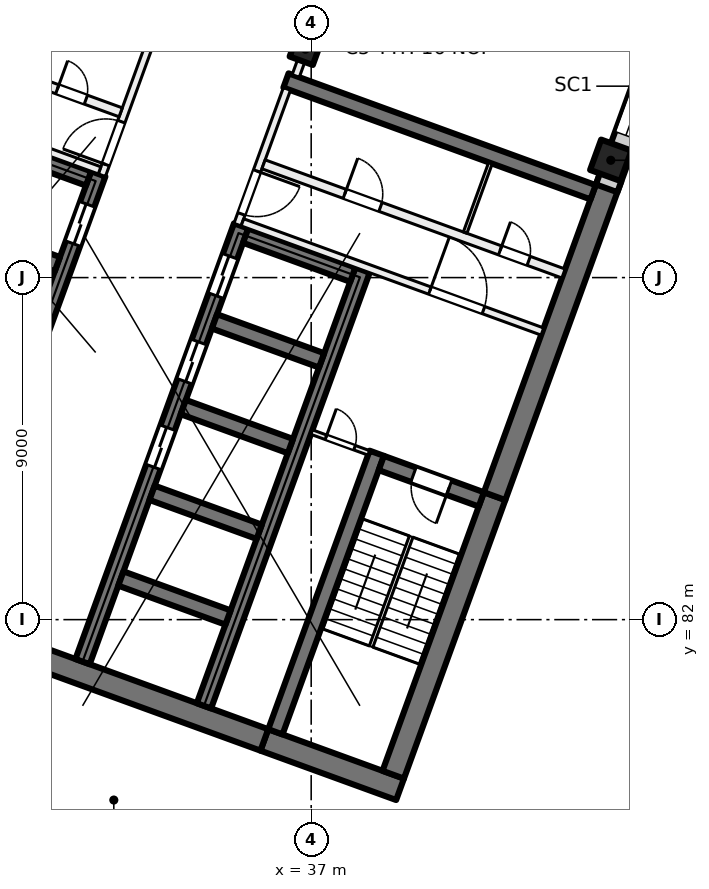
"""IFC4 building model, lengths in metres.
Left out: names, types, materials, properties, quantities, classifications, styles, units other than length and angle.
Written with IfcOpenShell. Run it as: python <this file> out.ifc"""

import sys

from ifc_helpers import new_model, si_unit, direction, frame, frame_2d, origin, origin_2d, place, context, subcontext, project, spatial, rectangle, extrude, element, fill, save


model = new_model("IFC4")
c1 = context("Model", 3, precision=1e-05, world=origin(), true_north=direction((0.0, 1.0)))
c2 = subcontext(c1, "Body", "Model", "MODEL_VIEW")
j1 = project(units=[si_unit("LENGTHUNIT", "METRE"), si_unit("PLANEANGLEUNIT", "RADIAN")], contexts=[c1])
p1 = place(None, origin())
s1 = spatial("IfcSite", under=j1, at=p1, CompositionType="ELEMENT")
p2 = place(p1, origin())
s2 = spatial("IfcBuilding", under=s1, at=p2, CompositionType="ELEMENT")
p3 = place(p2, frame((0.0, 0.0, 105.0)))
s3 = spatial("IfcBuildingStorey", under=s2, at=p3, CompositionType="ELEMENT", Elevation=105.0)
p4 = place(p3, frame((36.849, 97.011, 0.0), z_axis=(0.0, 0.0, 1.0), x_axis=(-0.342020143326, -0.939692620786, 0.0)))
e1 = element("IfcColumn", 1, at=p4, inside=s3, PredefinedType="COLUMN", context=c2, shape_type="SweptSolid", body=[
    extrude(rectangle(XDim=0.65, YDim=0.65, at=origin_2d()), origin(), (0.0, 0.0, 1.0), 4.0),
])
p5 = place(p3, frame((44.884, 94.087, 0.0), z_axis=(0.0, 0.0, 1.0), x_axis=(-0.342020143326, -0.939692620786, 0.0)))
e2 = element("IfcColumn", 2, at=p5, inside=s3, PredefinedType="COLUMN", context=c2, shape_type="SweptSolid", body=[
    extrude(rectangle(XDim=0.85, YDim=0.85, at=origin_2d()), origin(), (0.0, 0.0, 1.0), 4.0),
])
p6 = place(p3, frame((39.338, 77.535, 0.0), z_axis=(0.0, 0.0, 1.0), x_axis=(-0.939701471648, 0.341995824804, 0.0)))
e3 = element("IfcWall", 3, at=p6, inside=s3, PredefinedType="SHEAR", context=c2, shape_type="SweptSolid", body=[
    extrude(rectangle(XDim=3.8, YDim=0.6, at=frame_2d((1.9, 0.0))), origin(), (0.0, 0.0, 1.0), 4.0),
])
p7 = place(p3, frame((35.767, 78.835, 0.0), z_axis=(0.0, 0.0, 1.0), x_axis=(-0.939692894512, 0.342019391267, 0.0)))
e4 = element("IfcWall", 4, at=p7, inside=s3, PredefinedType="SHEAR", context=c2, shape_type="SweptSolid", body=[
    extrude(rectangle(XDim=14.4, YDim=0.6, at=frame_2d((7.2, 0.0))), origin(), (0.0, 0.0, 1.0), 4.0),
])
p8 = place(p3, frame((39.159, 77.92, 0.0), z_axis=(0.0, 0.0, 1.0), x_axis=(0.342016982193, 0.939693771338, 0.0)))
e5 = element("IfcWall", 5, at=p8, inside=s3, PredefinedType="SHEAR", context=c2, shape_type="SweptSolid", body=[
    extrude(rectangle(XDim=7.8, YDim=0.6, at=frame_2d((3.9, 0.0))), origin(), (0.0, 0.0, 1.0), 4.0),
])
p9 = place(p3, frame((41.827, 85.249, 0.0), z_axis=(0.0, 0.0, 1.0), x_axis=(0.342017595281, 0.939693548195, 0.0)))
e6 = element("IfcWall", 6, at=p9, inside=s3, PredefinedType="SHEAR", context=c2, shape_type="SweptSolid", body=[
    extrude(rectangle(XDim=8.925, YDim=0.6, at=frame_2d((4.462, 0.0))), origin(), (0.0, 0.0, 1.0), 4.0),
])
p10 = place(p3, frame((36.058, 79.048, 0.0), z_axis=(0.0, 0.0, 1.0), x_axis=(0.342016982193, 0.939693771338, 0.0)))
e7 = element("IfcWall", 7, at=p10, inside=s3, PredefinedType="SHEAR", context=c2, shape_type="SweptSolid", body=[
    extrude(rectangle(XDim=7.8, YDim=0.4, at=frame_2d((3.9, 0.0))), origin(), (0.0, 0.0, 1.0), 4.0),
])
p11 = place(p3, frame((41.476, 85.164, 0.0), z_axis=(0.0, 0.0, 1.0), x_axis=(-0.939678810556, 0.342058084236, 0.0)))
e8 = element("IfcWall", 8, at=p11, inside=s3, PredefinedType="SHEAR", context=c2, shape_type="SweptSolid", body=[
    extrude(rectangle(XDim=2.8, YDim=0.4, at=frame_2d((1.4, 0.0))), origin(), (0.0, 0.0, 1.0), 4.0),
])
p12 = place(p11, frame((0.9, 0.0, 0.0)))
e9 = element("IfcOpeningElement", 9, at=p12, cuts=e8, PredefinedType="OPENING", context=c2, shape_type="SweptSolid", body=[
    extrude(rectangle(XDim=1.0, YDim=2.1, at=frame_2d((0.5, 1.05))), frame((0.0, 0.21, 0.0), z_axis=(0.0, -1.0, 0.0), x_axis=(1.0, 0.0, 0.0)), (0.0, 0.0, 1.0), 0.42),
])
p13 = place(p3, frame((30.984, 80.895, 0.0), z_axis=(0.0, 0.0, 1.0), x_axis=(0.342021021735, 0.939692301071, 0.0)))
e10 = element("IfcWall", 10, at=p13, inside=s3, PredefinedType="SHEAR", context=c2, shape_type="SweptSolid", body=[
    extrude(rectangle(XDim=12.2, YDim=0.4, at=frame_2d((6.1, 0.0))), origin(), (0.0, 0.0, 1.0), 4.0),
])
p14 = place(p13, frame((5.45, 0.0, 0.0)))
e11 = element("IfcOpeningElement", 11, at=p14, cuts=e10, PredefinedType="OPENING", context=c2, shape_type="SweptSolid", body=[
    extrude(rectangle(XDim=1.1, YDim=2.1, at=frame_2d((0.55, 1.05))), frame((0.0, 0.21, 0.0), z_axis=(0.0, -1.0, 0.0), x_axis=(1.0, 0.0, 0.0)), (0.0, 0.0, 1.0), 0.42),
])
p15 = place(p13, frame((7.85, 0.0, 0.0)))
e12 = element("IfcOpeningElement", 12, at=p15, cuts=e10, PredefinedType="OPENING", context=c2, shape_type="SweptSolid", body=[
    extrude(rectangle(XDim=1.1, YDim=2.1, at=frame_2d((0.55, 1.05))), frame((0.0, 0.21, 0.0), z_axis=(0.0, -1.0, 0.0), x_axis=(1.0, 0.0, 0.0)), (0.0, 0.0, 1.0), 0.42),
])
p16 = place(p13, frame((10.25, 0.0, 0.0)))
e13 = element("IfcOpeningElement", 13, at=p16, cuts=e10, PredefinedType="OPENING", context=c2, shape_type="SweptSolid", body=[
    extrude(rectangle(XDim=1.1, YDim=2.1, at=frame_2d((0.55, 1.05))), frame((0.0, 0.21, 0.0), z_axis=(0.0, -1.0, 0.0), x_axis=(1.0, 0.0, 0.0)), (0.0, 0.0, 1.0), 0.42),
])
p17 = place(p3, frame((34.178, 79.732, 0.0), z_axis=(0.0, 0.0, 1.0), x_axis=(0.342014590177, 0.939694641948, 0.0)))
e14 = element("IfcWall", 14, at=p17, inside=s3, PredefinedType="SHEAR", context=c2, shape_type="SweptSolid", body=[
    extrude(rectangle(XDim=12.2, YDim=0.4, at=frame_2d((6.1, 0.0))), origin(), (0.0, 0.0, 1.0), 4.0),
])
for number, where, z_axis, x_axis in (
    (15, (34.812, 82.056, 0.0), (0.0, 0.0, 1.0), (-0.94, 0.342, 0.0)),
    (16, (35.632, 84.311, 0.0), (0.0, 0.0, 1.0), (-0.94, 0.342, 0.0)),
    (17, (36.453, 86.566, 0.0), (0.0, 0.0, 1.0), (-0.94, 0.342, 0.0)),
    (18, (37.274, 88.822, 0.0), (0.0, 0.0, 1.0), (-0.94, 0.342, 0.0)),
):
    element("IfcWall", number, at=place(p3, frame(where, z_axis=z_axis, x_axis=x_axis)), inside=s3, PredefinedType="SHEAR", context=c2, shape_type="SweptSolid", body=[
        extrude(rectangle(XDim=3.0, YDim=0.4, at=frame_2d((1.5, 0.0))), origin(), (0.0, 0.0, 1.0), 4.0),
    ])
p18 = place(p3, frame((38.095, 91.077, 0.0), z_axis=(0.0, 0.0, 1.0), x_axis=(-0.939676934218, 0.342063238742, 0.0)))
e19 = element("IfcWall", 19, at=p18, inside=s3, PredefinedType="SHEAR", context=c2, shape_type="SweptSolid", body=[
    extrude(rectangle(XDim=3.0, YDim=0.4, at=frame_2d((1.5, 0.0))), origin(), (0.0, 0.0, 1.0), 4.0),
])
p19 = place(p3, frame((27.225, 82.263, 0.0), z_axis=(0.0, 0.0, 1.0), x_axis=(0.342014590177, 0.939694641948, 0.0)))
e20 = element("IfcWall", 20, at=p19, inside=s3, PredefinedType="SHEAR", context=c2, shape_type="SweptSolid", body=[
    extrude(rectangle(XDim=12.2, YDim=0.4, at=frame_2d((6.1, 0.0))), origin(), (0.0, 0.0, 1.0), 4.0),
])
p20 = place(p19, frame((10.25, 0.0, 0.0)))
e21 = element("IfcOpeningElement", 21, at=p20, cuts=e20, PredefinedType="OPENING", context=c2, shape_type="SweptSolid", body=[
    extrude(rectangle(XDim=1.1, YDim=2.1, at=frame_2d((0.55, 1.05))), frame((0.0, 0.21, 0.0), z_axis=(0.0, -1.0, 0.0), x_axis=(1.0, 0.0, 0.0)), (0.0, 0.0, 1.0), 0.42),
])
p21 = place(p19, frame((0.7, 0.0, 0.0)))
e22 = element("IfcOpeningElement", 22, at=p21, cuts=e20, PredefinedType="OPENING", context=c2, shape_type="SweptSolid", body=[
    extrude(rectangle(XDim=0.8, YDim=2.1, at=frame_2d((0.4, 1.05))), frame((0.0, 0.21, 0.0), z_axis=(0.0, -1.0, 0.0), x_axis=(1.0, 0.0, 0.0)), (0.0, 0.0, 1.0), 0.42),
])
for number, where, z_axis, x_axis in (
    (23, (30.32, 91.353, 0.0), (0.0, 0.0, 1.0), (-0.94, 0.342, 0.0)),
    (24, (31.141, 93.608, 0.0), (0.0, 0.0, 1.0), (-0.94, 0.342, 0.0)),
):
    element("IfcWall", number, at=place(p3, frame(where, z_axis=z_axis, x_axis=x_axis)), inside=s3, PredefinedType="SHEAR", context=c2, shape_type="SweptSolid", body=[
        extrude(rectangle(XDim=3.0, YDim=0.4, at=frame_2d((1.5, 0.0))), origin(), (0.0, 0.0, 1.0), 4.0),
    ])
p22 = place(p3, frame((44.418, 93.245, 0.0), z_axis=(0.0, 0.0, 1.0), x_axis=(-0.93969060187, 0.342025690201, 0.0)))
e25 = element("IfcWall", 25, at=p22, inside=s3, PredefinedType="SHEAR", context=c2, shape_type="SweptSolid", body=[
    extrude(rectangle(XDim=8.6, YDim=0.4, at=frame_2d((4.3, 0.0))), origin(), (0.0, 0.0, 1.0), 4.0),
])
p23 = place(p3, frame((51.877, 112.862, 0.0), z_axis=(0.0, 0.0, 1.0), x_axis=(-0.342020589714, -0.939692458314, 0.0)))
e26 = element("IfcWall", 26, at=p23, inside=s3, PredefinedType="SOLIDWALL", context=c2, shape_type="SweptSolid", body=[
    extrude(rectangle(XDim=20.765, YDim=0.6, at=frame_2d((10.382, 0.0))), origin(), (0.0, 0.0, 1.0), 3.625),
])
p24 = place(p23, frame((2.785, 0.0, 0.9)))
e27 = element("IfcOpeningElement", 27, at=p24, cuts=e26, PredefinedType="OPENING", context=c2, shape_type="SweptSolid", body=[
    extrude(rectangle(XDim=3.0, YDim=2.4, at=frame_2d((1.5, 1.2))), frame((0.0, 0.31, 0.0), z_axis=(0.0, -1.0, 0.0), x_axis=(1.0, 0.0, 0.0)), (0.0, 0.0, 1.0), 0.62),
])
p25 = place(p23, frame((7.285, 0.0, 0.9)))
e28 = element("IfcOpeningElement", 28, at=p25, cuts=e26, PredefinedType="OPENING", context=c2, shape_type="SweptSolid", body=[
    extrude(rectangle(XDim=3.0, YDim=2.4, at=frame_2d((1.5, 1.2))), frame((0.0, 0.31, 0.0), z_axis=(0.0, -1.0, 0.0), x_axis=(1.0, 0.0, 0.0)), (0.0, 0.0, 1.0), 0.62),
])
p26 = place(p23, frame((11.785, 0.0, 0.9)))
e29 = element("IfcOpeningElement", 29, at=p26, cuts=e26, PredefinedType="OPENING", context=c2, shape_type="SweptSolid", body=[
    extrude(rectangle(XDim=3.0, YDim=2.4, at=frame_2d((1.5, 1.2))), frame((0.0, 0.31, 0.0), z_axis=(0.0, -1.0, 0.0), x_axis=(1.0, 0.0, 0.0)), (0.0, 0.0, 1.0), 0.62),
])
p27 = place(p23, frame((16.285, 0.0, 0.9)))
e30 = element("IfcOpeningElement", 30, at=p27, cuts=e26, PredefinedType="OPENING", context=c2, shape_type="SweptSolid", body=[
    extrude(rectangle(XDim=3.0, YDim=2.4, at=frame_2d((1.5, 1.2))), frame((0.0, 0.31, 0.0), z_axis=(0.0, -1.0, 0.0), x_axis=(1.0, 0.0, 0.0)), (0.0, 0.0, 1.0), 0.62),
])
p28 = place(p3, frame((31.491, 93.693, 0.0), z_axis=(0.0, 0.0, 1.0), x_axis=(0.341995824804, 0.939701471648, 0.0)))
e31 = element("IfcWall", 31, at=p28, inside=s3, PredefinedType="PARTITIONING", context=c2, shape_type="SweptSolid", body=[
    extrude(rectangle(XDim=3.8, YDim=0.2, at=frame_2d((1.9, 0.0))), origin(), (0.0, 0.0, 1.0), 3.625),
])
p29 = place(p28, frame((0.3, 0.0, 0.0)))
e32 = element("IfcOpeningElement", 32, at=p29, cuts=e31, PredefinedType="OPENING", context=c2, shape_type="SweptSolid", body=[
    extrude(rectangle(XDim=1.2, YDim=2.1, at=frame_2d((0.6, 1.05))), frame((0.0, 0.11, 0.0), z_axis=(0.0, -1.0, 0.0), x_axis=(1.0, 0.0, 0.0)), (0.0, 0.0, 1.0), 0.22),
])
p30 = place(p3, frame((23.538, 96.694, 0.0), z_axis=(0.0, 0.0, 1.0), x_axis=(0.939691552312, -0.342023078919, 0.0)))
e33 = element("IfcWall", 33, at=p30, inside=s3, PredefinedType="PARTITIONING", context=c2, shape_type="SweptSolid", body=[
    extrude(rectangle(XDim=8.4, YDim=0.2, at=frame_2d((4.2, 0.0))), origin(), (0.0, 0.0, 1.0), 3.625),
])
p31 = place(p30, frame((1.65, 0.0, 0.0)))
e34 = element("IfcOpeningElement", 34, at=p31, cuts=e33, PredefinedType="OPENING", context=c2, shape_type="SweptSolid", body=[
    extrude(rectangle(XDim=1.5, YDim=2.1, at=frame_2d((0.75, 1.05))), frame((0.0, 0.11, 0.0), z_axis=(0.0, -1.0, 0.0), x_axis=(1.0, 0.0, 0.0)), (0.0, 0.0, 1.0), 0.22),
])
p32 = place(p3, frame((24.094, 98.221, 0.0), z_axis=(0.0, 0.0, 1.0), x_axis=(0.939691552312, -0.342023078919, 0.0)))
e35 = element("IfcWall", 35, at=p32, inside=s3, PredefinedType="PARTITIONING", context=c2, shape_type="SweptSolid", body=[
    extrude(rectangle(XDim=8.4, YDim=0.25, at=frame_2d((4.2, 0.0))), origin(), (0.0, 0.0, 1.0), 3.625),
])
p33 = place(p32, frame((6.625, 0.0, 0.0)))
e36 = element("IfcOpeningElement", 36, at=p33, cuts=e35, PredefinedType="OPENING", context=c2, shape_type="SweptSolid", body=[
    extrude(rectangle(XDim=0.8, YDim=2.1, at=frame_2d((0.4, 1.05))), frame((0.0, 0.135, 0.0), z_axis=(0.0, -1.0, 0.0), x_axis=(1.0, 0.0, 0.0)), (0.0, 0.0, 1.0), 0.27),
])
p34 = place(p32, frame((2.375, 0.0, 0.0)))
e37 = element("IfcOpeningElement", 37, at=p34, cuts=e35, PredefinedType="OPENING", context=c2, shape_type="SweptSolid", body=[
    extrude(rectangle(XDim=0.8, YDim=2.1, at=frame_2d((0.4, 1.05))), frame((0.0, 0.135, 0.0), z_axis=(0.0, -1.0, 0.0), x_axis=(1.0, 0.0, 0.0)), (0.0, 0.0, 1.0), 0.27),
])
p35 = place(p3, frame((36.362, 95.964, 0.0), z_axis=(0.0, 0.0, 1.0), x_axis=(-0.341995824804, -0.939701471648, 0.0)))
e38 = element("IfcWall", 38, at=p35, inside=s3, PredefinedType="PARTITIONING", context=c2, shape_type="SweptSolid", body=[
    extrude(rectangle(XDim=3.8, YDim=0.2, at=frame_2d((1.9, 0.0))), origin(), (0.0, 0.0, 1.0), 3.625),
])
p36 = place(p35, frame((2.3, 0.0, 0.0)))
e39 = element("IfcOpeningElement", 39, at=p36, cuts=e38, PredefinedType="OPENING", context=c2, shape_type="SweptSolid", body=[
    extrude(rectangle(XDim=1.2, YDim=2.1, at=frame_2d((0.6, 1.05))), frame((0.0, 0.11, 0.0), z_axis=(0.0, -1.0, 0.0), x_axis=(1.0, 0.0, 0.0)), (0.0, 0.0, 1.0), 0.22),
])
p37 = place(p3, frame((35.19, 92.453, 0.0), z_axis=(0.0, 0.0, 1.0), x_axis=(0.939691552312, -0.342023078919, 0.0)))
e40 = element("IfcWall", 40, at=p37, inside=s3, PredefinedType="PARTITIONING", context=c2, shape_type="SweptSolid", body=[
    extrude(rectangle(XDim=8.4, YDim=0.2, at=frame_2d((4.2, 0.0))), origin(), (0.0, 0.0, 1.0), 3.625),
])
p38 = place(p37, frame((5.25, 0.0, 0.0)))
e41 = element("IfcOpeningElement", 41, at=p38, cuts=e40, PredefinedType="OPENING", context=c2, shape_type="SweptSolid", body=[
    extrude(rectangle(XDim=1.5, YDim=2.1, at=frame_2d((0.75, 1.05))), frame((0.0, 0.11, 0.0), z_axis=(0.0, -1.0, 0.0), x_axis=(1.0, 0.0, 0.0)), (0.0, 0.0, 1.0), 0.22),
])
p39 = place(p3, frame((35.746, 93.98, 0.0), z_axis=(0.0, 0.0, 1.0), x_axis=(0.939691552312, -0.342023078919, 0.0)))
e42 = element("IfcWall", 42, at=p39, inside=s3, PredefinedType="PARTITIONING", context=c2, shape_type="SweptSolid", body=[
    extrude(rectangle(XDim=8.4, YDim=0.25, at=frame_2d((4.2, 0.0))), origin(), (0.0, 0.0, 1.0), 3.625),
])
p40 = place(p39, frame((2.275, 0.0, 0.0)))
e43 = element("IfcOpeningElement", 43, at=p40, cuts=e42, PredefinedType="OPENING", context=c2, shape_type="SweptSolid", body=[
    extrude(rectangle(XDim=1.0, YDim=2.1, at=frame_2d((0.5, 1.05))), frame((0.0, 0.135, 0.0), z_axis=(0.0, -1.0, 0.0), x_axis=(1.0, 0.0, 0.0)), (0.0, 0.0, 1.0), 0.27),
])
p41 = place(p39, frame((6.625, 0.0, 0.0)))
e44 = element("IfcOpeningElement", 44, at=p41, cuts=e42, PredefinedType="OPENING", context=c2, shape_type="SweptSolid", body=[
    extrude(rectangle(XDim=0.8, YDim=2.1, at=frame_2d((0.4, 1.05))), frame((0.0, 0.135, 0.0), z_axis=(0.0, -1.0, 0.0), x_axis=(1.0, 0.0, 0.0)), (0.0, 0.0, 1.0), 0.27),
])
p42 = place(p3, frame((37.013, 86.935, 0.0), z_axis=(0.0, 0.0, 1.0), x_axis=(0.939659694648, -0.342110593602, 0.0)))
e45 = element("IfcWall", 45, at=p42, inside=s3, PredefinedType="PARTITIONING", context=c2, shape_type="SweptSolid", body=[
    extrude(rectangle(XDim=1.6, YDim=0.125, at=frame_2d((0.8, 0.0))), origin(), (0.0, 0.0, 1.0), 3.625),
])
p43 = place(p42, frame((0.4, 0.0, 0.0)))
e46 = element("IfcOpeningElement", 46, at=p43, cuts=e45, PredefinedType="OPENING", context=c2, shape_type="SweptSolid", body=[
    extrude(rectangle(XDim=0.8, YDim=2.1, at=frame_2d((0.4, 1.05))), frame((0.0, 0.073, 0.0), z_axis=(0.0, -1.0, 0.0), x_axis=(1.0, 0.0, 0.0)), (0.0, 0.0, 1.0), 0.145),
])
p44 = place(p3, frame((41.718, 94.015, 0.0), z_axis=(0.0, 0.0, 1.0), x_axis=(-0.342064742067, -0.939676386973, 0.0)))
e47 = element("IfcWall", 47, at=p44, inside=s3, PredefinedType="PARTITIONING", context=c2, shape_type="SweptSolid", body=[
    extrude(rectangle(XDim=1.95, YDim=0.1, at=frame_2d((0.975, 0.0))), origin(), (0.0, 0.0, 1.0), 3.625),
])
p45 = place(p3, frame((39.928, 105.468, 0.0), z_axis=(0.0, 0.0, 1.0), x_axis=(-0.34204059653, -0.939685176176, 0.0)))
e48 = element("IfcWall", 48, at=p45, inside=s3, PredefinedType="PARTITIONING", context=c2, shape_type="SweptSolid", body=[
    extrude(rectangle(XDim=9.75, YDim=0.2, at=frame_2d((4.875, 0.0))), origin(), (0.0, 0.0, 1.0), 3.625),
])
p46 = place(p45, frame((4.373, 0.0, 0.0)))
e49 = element("IfcOpeningElement", 49, at=p46, cuts=e48, PredefinedType="OPENING", context=c2, shape_type="SweptSolid", body=[
    extrude(rectangle(XDim=1.0, YDim=2.1, at=frame_2d((0.5, 1.05))), frame((0.0, 0.11, 0.0), z_axis=(0.0, -1.0, 0.0), x_axis=(1.0, 0.0, 0.0)), (0.0, 0.0, 1.0), 0.22),
])
p47 = place(p27, origin())
e50 = element("IfcWindow", 50, at=p47, inside=s3, PartitioningType="SINGLE_PANEL", PredefinedType="WINDOW", context=c2, shape_type="SweptSolid", body=[
    extrude(rectangle(XDim=3.0, YDim=2.4, at=frame_2d((1.5, 1.2))), frame((0.0, 0.03, 0.0), z_axis=(0.0, -1.0, 0.0), x_axis=(1.0, 0.0, 0.0)), (0.0, 0.0, 1.0), 0.06),
])
fill(e30, e50)
p48 = place(p20, origin())
e51 = element("IfcDoor", 51, at=p48, inside=s3, OperationType="DOUBLE_DOOR_SLIDING", PredefinedType="DOOR", context=c2, shape_type="SweptSolid", body=[
    extrude(rectangle(XDim=1.1, YDim=2.1, at=frame_2d((0.55, 1.05))), frame((0.0, 0.025, 0.0), z_axis=(0.0, -1.0, 0.0), x_axis=(1.0, 0.0, 0.0)), (0.0, 0.0, 1.0), 0.05),
])
fill(e21, e51)
p49 = place(p14, origin())
e52 = element("IfcDoor", 52, at=p49, inside=s3, OperationType="DOUBLE_DOOR_SLIDING", PredefinedType="DOOR", context=c2, shape_type="SweptSolid", body=[
    extrude(rectangle(XDim=1.1, YDim=2.1, at=frame_2d((0.55, 1.05))), frame((0.0, 0.025, 0.0), z_axis=(0.0, -1.0, 0.0), x_axis=(1.0, 0.0, 0.0)), (0.0, 0.0, 1.0), 0.05),
])
fill(e11, e52)
p50 = place(p15, origin())
e53 = element("IfcDoor", 53, at=p50, inside=s3, OperationType="DOUBLE_DOOR_SLIDING", PredefinedType="DOOR", context=c2, shape_type="SweptSolid", body=[
    extrude(rectangle(XDim=1.1, YDim=2.1, at=frame_2d((0.55, 1.05))), frame((0.0, 0.025, 0.0), z_axis=(0.0, -1.0, 0.0), x_axis=(1.0, 0.0, 0.0)), (0.0, 0.0, 1.0), 0.05),
])
fill(e12, e53)
p51 = place(p16, origin())
e54 = element("IfcDoor", 54, at=p51, inside=s3, OperationType="DOUBLE_DOOR_SLIDING", PredefinedType="DOOR", context=c2, shape_type="SweptSolid", body=[
    extrude(rectangle(XDim=1.1, YDim=2.1, at=frame_2d((0.55, 1.05))), frame((0.0, 0.025, 0.0), z_axis=(0.0, -1.0, 0.0), x_axis=(1.0, 0.0, 0.0)), (0.0, 0.0, 1.0), 0.05),
])
fill(e13, e54)
p52 = place(p29, origin())
e55 = element("IfcDoor", 55, at=p52, inside=s3, OperationType="DOUBLE_DOOR_SINGLE_SWING", PredefinedType="DOOR", context=c2, shape_type="SweptSolid", body=[
    extrude(rectangle(XDim=1.2, YDim=2.1, at=frame_2d((0.6, 1.05))), frame((0.0, 0.025, 0.0), z_axis=(0.0, -1.0, 0.0), x_axis=(1.0, 0.0, 0.0)), (0.0, 0.0, 1.0), 0.05),
])
fill(e32, e55)
p53 = place(p33, origin())
e56 = element("IfcDoor", 56, at=p53, inside=s3, OperationType="SINGLE_SWING_LEFT", PredefinedType="DOOR", context=c2, shape_type="SweptSolid", body=[
    extrude(rectangle(XDim=0.8, YDim=2.1, at=frame_2d((0.4, 1.05))), frame((0.0, 0.025, 0.0), z_axis=(0.0, -1.0, 0.0), x_axis=(1.0, 0.0, 0.0)), (0.0, 0.0, 1.0), 0.05),
])
fill(e36, e56)
p54 = place(p36, origin())
e57 = element("IfcDoor", 57, at=p54, inside=s3, OperationType="DOUBLE_DOOR_SINGLE_SWING", PredefinedType="DOOR", context=c2, shape_type="SweptSolid", body=[
    extrude(rectangle(XDim=1.2, YDim=2.1, at=frame_2d((0.6, 1.05))), frame((0.0, 0.025, 0.0), z_axis=(0.0, -1.0, 0.0), x_axis=(1.0, 0.0, 0.0)), (0.0, 0.0, 1.0), 0.05),
])
fill(e39, e57)
p55 = place(p38, origin())
e58 = element("IfcDoor", 58, at=p55, inside=s3, OperationType="DOUBLE_DOOR_SINGLE_SWING", PredefinedType="DOOR", context=c2, shape_type="SweptSolid", body=[
    extrude(rectangle(XDim=1.5, YDim=2.1, at=frame_2d((0.75, 1.05))), frame((0.0, 0.025, 0.0), z_axis=(0.0, -1.0, 0.0), x_axis=(1.0, 0.0, 0.0)), (0.0, 0.0, 1.0), 0.05),
])
fill(e41, e58)
p56 = place(p12, origin())
e59 = element("IfcDoor", 59, at=p56, inside=s3, OperationType="SINGLE_SWING_RIGHT", PredefinedType="DOOR", context=c2, shape_type="SweptSolid", body=[
    extrude(rectangle(XDim=1.0, YDim=2.1, at=frame_2d((0.5, 1.05))), frame((0.0, 0.025, 0.0), z_axis=(0.0, -1.0, 0.0), x_axis=(1.0, 0.0, 0.0)), (0.0, 0.0, 1.0), 0.05),
])
fill(e9, e59)
p57 = place(p43, origin())
e60 = element("IfcDoor", 60, at=p57, inside=s3, OperationType="SINGLE_SWING_LEFT", PredefinedType="DOOR", context=c2, shape_type="SweptSolid", body=[
    extrude(rectangle(XDim=0.8, YDim=2.1, at=frame_2d((0.4, 1.05))), frame((0.0, 0.025, 0.0), z_axis=(0.0, -1.0, 0.0), x_axis=(1.0, 0.0, 0.0)), (0.0, 0.0, 1.0), 0.05),
])
fill(e46, e60)
p58 = place(p40, origin())
e61 = element("IfcDoor", 61, at=p58, inside=s3, OperationType="SINGLE_SWING_RIGHT", PredefinedType="DOOR", context=c2, shape_type="SweptSolid", body=[
    extrude(rectangle(XDim=1.0, YDim=2.1, at=frame_2d((0.5, 1.05))), frame((0.0, 0.025, 0.0), z_axis=(0.0, -1.0, 0.0), x_axis=(1.0, 0.0, 0.0)), (0.0, 0.0, 1.0), 0.05),
])
fill(e43, e61)
p59 = place(p41, origin())
e62 = element("IfcDoor", 62, at=p59, inside=s3, OperationType="SINGLE_SWING_LEFT", PredefinedType="DOOR", context=c2, shape_type="SweptSolid", body=[
    extrude(rectangle(XDim=0.8, YDim=2.1, at=frame_2d((0.4, 1.05))), frame((0.0, 0.025, 0.0), z_axis=(0.0, -1.0, 0.0), x_axis=(1.0, 0.0, 0.0)), (0.0, 0.0, 1.0), 0.05),
])
fill(e44, e62)
save(model, sys.argv[1])
